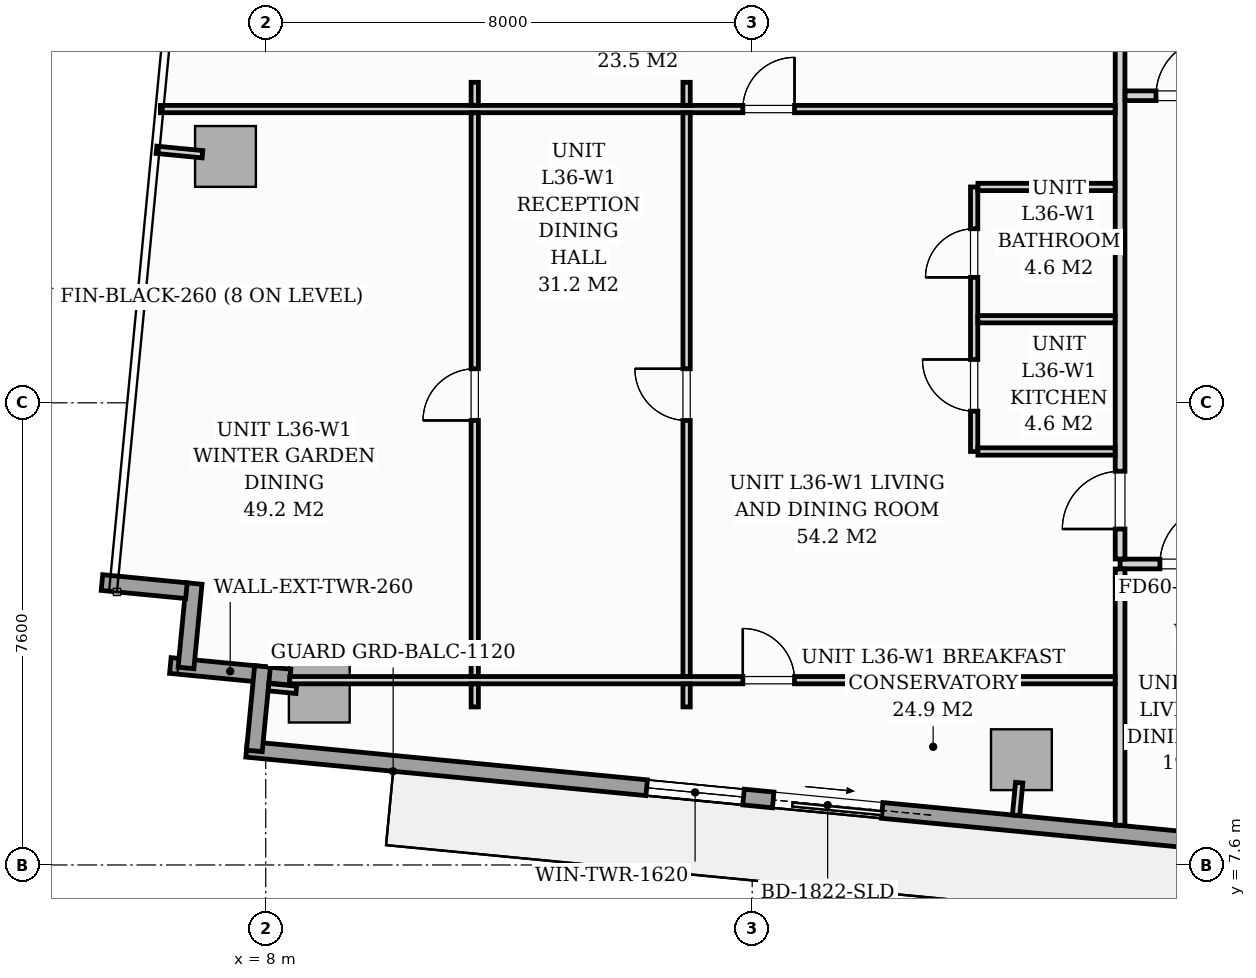
"""IFC4 building model, lengths in metres.
Left out: names, types, materials, properties, quantities, classifications, styles, units other than length and angle.
Written with IfcOpenShell. Run it as: python <this file> out.ifc"""

import sys

from ifc_helpers import new_model, si_unit, direction, frame, frame_2d, origin, origin_2d, place, context, subcontext, project, spatial, rectangle, extrude, source, transform, mapped, element, fill, save


model = new_model("IFC4")
c1 = context("Model", 3, precision=1e-05, world=origin(), true_north=direction((0.0, 1.0)))
c2 = subcontext(c1, "Body", "Model", "MODEL_VIEW")
j1 = project(units=[si_unit("LENGTHUNIT", "METRE"), si_unit("PLANEANGLEUNIT", "RADIAN")], contexts=[c1])
p1 = place(None, origin())
s1 = spatial("IfcSite", under=j1, at=p1, CompositionType="ELEMENT")
p2 = place(p1, origin())
s2 = spatial("IfcBuilding", under=s1, at=p2, CompositionType="ELEMENT")
p3 = place(p2, frame((0.0, 0.0, 127.8)))
s3 = spatial("IfcBuildingStorey", under=s2, at=p3, CompositionType="ELEMENT", Elevation=127.8)
m1 = source(origin(), c2, "Body", "SweptSolid", [
    extrude(rectangle(XDim=1.0, YDim=1.0, at=origin_2d()), origin(), (0.0, 0.0, 1.0), 3.196),
])
for number, where, z_axis, x_axis in (
    (1, (8.881, 10.443, 0.002), (0.0, 0.0, 1.0), (0.995, -0.096, 0.0)),
    (2, (20.427, 9.332, 0.002), (0.0, 0.0, 1.0), (0.995, -0.096, 0.0)),
    (3, (7.338, 19.252, 0.002), (0.0, 0.0, 1.0), (0.995, -0.096, 0.0)),
):
    element("IfcColumn", number, at=place(p3, frame(where, z_axis=z_axis, x_axis=x_axis)), inside=s3, PredefinedType="COLUMN", context=c2, shape_type="MappedRepresentation", body=[
        mapped(m1, transform((0.0, 0.0, 0.0), scale=1.0)),
    ])
p4 = place(p3, frame((8.4, 10.69, 0.0), z_axis=(0.0, 0.0, 1.0), x_axis=(-0.995391147587, 0.095898192396, 0.0)))
e4 = element("IfcWall", 4, at=p4, inside=s3, PredefinedType="STANDARD", context=c2, shape_type="SweptSolid", body=[
    extrude(rectangle(XDim=1.978, YDim=0.26, at=frame_2d((0.989, 0.0))), origin(), (0.0, 0.0, 1.0), 2.94),
])
p5 = place(p3, frame((6.688, 10.84, 0.0), z_axis=(0.0, 0.0, 1.0), x_axis=(0.09589913835, 0.995391056452, 0.0)))
e5 = element("IfcWall", 5, at=p5, inside=s3, PredefinedType="STANDARD", context=c2, shape_type="SweptSolid", body=[
    extrude(rectangle(XDim=1.395, YDim=0.26, at=frame_2d((0.698, 0.0))), origin(), (0.0, 0.0, 1.0), 2.94),
])
p6 = place(p3, frame((6.695, 12.111, 0.0), z_axis=(0.0, 0.0, 1.0), x_axis=(-0.99540614245, 0.095742423056, 0.0)))
e6 = element("IfcWall", 6, at=p6, inside=s3, PredefinedType="STANDARD", context=c2, shape_type="SweptSolid", body=[
    extrude(rectangle(XDim=1.395, YDim=0.26, at=frame_2d((0.697, 0.0))), origin(), (0.0, 0.0, 1.0), 2.94),
])
p7 = place(p3, frame((24.617, 7.873, 0.0), z_axis=(0.0, 0.0, 1.0), x_axis=(-0.995395976631, 0.095848055311, 0.0)))
e7 = element("IfcWall", 7, at=p7, inside=s3, PredefinedType="STANDARD", context=c2, shape_type="SweptSolid", body=[
    extrude(rectangle(XDim=17.01, YDim=0.26, at=frame_2d((8.505, 0.0))), origin(), (0.0, 0.0, 1.0), 2.94),
])
p8 = place(p7, frame((6.51, 0.0, 0.0)))
e8 = element("IfcOpeningElement", 8, at=p8, cuts=e7, PredefinedType="OPENING", context=c2, shape_type="SweptSolid", body=[
    extrude(rectangle(XDim=1.8, YDim=2.06, at=frame_2d((0.9, 1.03))), frame((0.0, 0.14, 0.0), z_axis=(0.0, -1.0, 0.0), x_axis=(1.0, 0.0, 0.0)), (0.0, 0.0, 1.0), 0.28),
])
p9 = place(p7, frame((8.8, 0.0, 0.65)))
e9 = element("IfcOpeningElement", 9, at=p9, cuts=e7, PredefinedType="OPENING", context=c2, shape_type="SweptSolid", body=[
    extrude(rectangle(XDim=1.6, YDim=1.5, at=frame_2d((0.8, 0.75))), frame((0.0, 0.14, 0.0), z_axis=(0.0, -1.0, 0.0), x_axis=(1.0, 0.0, 0.0)), (0.0, 0.0, 1.0), 0.28),
])
p10 = place(p3, frame((7.813, 9.476, 0.0), z_axis=(0.0, 0.0, 1.0), x_axis=(0.095915846097, 0.995389446633, 0.0)))
e10 = element("IfcWall", 10, at=p10, inside=s3, PredefinedType="STANDARD", context=c2, shape_type="SweptSolid", body=[
    extrude(rectangle(XDim=1.395, YDim=0.26, at=frame_2d((0.697, 0.0))), origin(), (0.0, 0.0, 1.0), 2.94),
])
p11 = place(p3, frame((22.05, 12.55, 0.0), z_axis=(0.0, 0.0, 1.0), x_axis=(1.0, 0.0, 0.0)))
e11 = element("IfcWall", 11, at=p11, inside=s3, PredefinedType="PARTITIONING", context=c2, shape_type="SweptSolid", body=[
    extrude(rectangle(XDim=23.83, YDim=0.16, at=frame_2d((11.915, 0.0))), origin(), (0.0, 0.0, 1.0), 2.94),
])
p12 = place(p11, frame((0.655, 0.0, 0.0)))
e12 = element("IfcOpeningElement", 12, at=p12, cuts=e11, PredefinedType="OPENING", context=c2, shape_type="SweptSolid", body=[
    extrude(rectangle(XDim=0.95, YDim=2.06, at=frame_2d((0.475, 1.03))), frame((0.0, 0.09, 0.0), z_axis=(0.0, -1.0, 0.0), x_axis=(1.0, 0.0, 0.0)), (0.0, 0.0, 1.0), 0.18),
])
p13 = place(p11, frame((12.04, 0.0, 0.0)))
e13 = element("IfcOpeningElement", 13, at=p13, cuts=e11, PredefinedType="OPENING", context=c2, shape_type="SweptSolid", body=[
    extrude(rectangle(XDim=0.95, YDim=2.06, at=frame_2d((0.475, 1.03))), frame((0.0, 0.09, 0.0), z_axis=(0.0, -1.0, 0.0), x_axis=(1.0, 0.0, 0.0)), (0.0, 0.0, 1.0), 0.18),
])
p14 = place(p3, frame((22.05, 8.253, 0.0), z_axis=(0.0, 0.0, 1.0), x_axis=(0.0, 1.0, 0.0)))
e14 = element("IfcWall", 14, at=p14, inside=s3, PredefinedType="PARTITIONING", context=c2, shape_type="SweptSolid", body=[
    extrude(rectangle(XDim=4.215, YDim=0.16, at=frame_2d((2.107, 0.0))), origin(), (0.0, 0.0, 1.0), 2.94),
])
p15 = place(p3, frame((22.05, 12.632, 0.0), z_axis=(0.0, 0.0, 1.0), x_axis=(0.0, 1.0, 0.0)))
e15 = element("IfcWall", 15, at=p15, inside=s3, PredefinedType="PARTITIONING", context=c2, shape_type="SweptSolid", body=[
    extrude(rectangle(XDim=14.785, YDim=0.16, at=frame_2d((7.393, 0.0))), origin(), (0.0, 0.0, 1.0), 2.94),
])
p16 = place(p15, frame((0.493, 0.0, 0.0)))
e16 = element("IfcOpeningElement", 16, at=p16, cuts=e15, PredefinedType="OPENING", context=c2, shape_type="SweptSolid", body=[
    extrude(rectangle(XDim=0.95, YDim=2.06, at=frame_2d((0.475, 1.03))), frame((0.0, 0.09, 0.0), z_axis=(0.0, -1.0, 0.0), x_axis=(1.0, 0.0, 0.0)), (0.0, 0.0, 1.0), 0.18),
])
p17 = place(p3, frame((19.65, 14.4, 0.0), z_axis=(0.0, 0.0, 1.0), x_axis=(0.0, 1.0, 0.0)))
e17 = element("IfcWall", 17, at=p17, inside=s3, PredefinedType="PARTITIONING", context=c2, shape_type="SweptSolid", body=[
    extrude(rectangle(XDim=4.35, YDim=0.12, at=frame_2d((2.175, 0.0))), origin(), (0.0, 0.0, 1.0), 2.94),
])
p18 = place(p17, frame((0.663, 0.0, 0.0)))
e18 = element("IfcOpeningElement", 18, at=p18, cuts=e17, PredefinedType="OPENING", context=c2, shape_type="SweptSolid", body=[
    extrude(rectangle(XDim=0.85, YDim=2.05, at=frame_2d((0.425, 1.025))), frame((0.0, 0.07, 0.0), z_axis=(0.0, -1.0, 0.0), x_axis=(1.0, 0.0, 0.0)), (0.0, 0.0, 1.0), 0.14),
])
p19 = place(p17, frame((2.863, 0.0, 0.0)))
e19 = element("IfcOpeningElement", 19, at=p19, cuts=e17, PredefinedType="OPENING", context=c2, shape_type="SweptSolid", body=[
    extrude(rectangle(XDim=0.8, YDim=2.02, at=frame_2d((0.4, 1.01))), frame((0.0, 0.07, 0.0), z_axis=(0.0, -1.0, 0.0), x_axis=(1.0, 0.0, 0.0)), (0.0, 0.0, 1.0), 0.14),
])
for number, where, z_axis, x_axis in (
    (20, (19.712, 16.575, 0.0), (0.0, 0.0, 1.0), (1.0, 0.0, 0.0)),
    (21, (19.712, 14.4, 0.0), (0.0, 0.0, 1.0), (1.0, 0.0, 0.0)),
    (22, (19.712, 18.75, 0.0), (0.0, 0.0, 1.0), (1.0, 0.0, 0.0)),
):
    element("IfcWall", number, at=place(p3, frame(where, z_axis=z_axis, x_axis=x_axis)), inside=s3, PredefinedType="PARTITIONING", context=c2, shape_type="SweptSolid", body=[
        extrude(rectangle(XDim=2.256, YDim=0.12, at=frame_2d((1.128, 0.0))), origin(), (0.0, 0.0, 1.0), 2.94),
    ])
p20 = place(p3, frame((8.395, 10.639, 0.0), z_axis=(0.0, 0.0, 1.0), x_axis=(1.0, 0.0, 0.0)))
e23 = element("IfcWall", 23, at=p20, inside=s3, PredefinedType="PARTITIONING", context=c2, shape_type="SweptSolid", body=[
    extrude(rectangle(XDim=13.573, YDim=0.12, at=frame_2d((6.787, 0.0))), origin(), (0.0, 0.0, 1.0), 2.94),
])
p21 = place(p20, frame((7.451, 0.0, 0.0)))
e24 = element("IfcOpeningElement", 24, at=p21, cuts=e23, PredefinedType="OPENING", context=c2, shape_type="SweptSolid", body=[
    extrude(rectangle(XDim=0.85, YDim=2.05, at=frame_2d((0.425, 1.025))), frame((0.0, 0.07, 0.0), z_axis=(0.0, -1.0, 0.0), x_axis=(1.0, 0.0, 0.0)), (0.0, 0.0, 1.0), 0.14),
])
p22 = place(p3, frame((6.268, 20.031, 0.0), z_axis=(0.0, 0.0, 1.0), x_axis=(1.0, 0.0, 0.0)))
e25 = element("IfcWall", 25, at=p22, inside=s3, PredefinedType="PARTITIONING", context=c2, shape_type="SweptSolid", body=[
    extrude(rectangle(XDim=15.7, YDim=0.12, at=frame_2d((7.85, 0.0))), origin(), (0.0, 0.0, 1.0), 2.94),
])
p23 = place(p22, frame((9.579, 0.0, 0.0)))
e26 = element("IfcOpeningElement", 26, at=p23, cuts=e25, PredefinedType="OPENING", context=c2, shape_type="SweptSolid", body=[
    extrude(rectangle(XDim=0.85, YDim=2.05, at=frame_2d((0.425, 1.025))), frame((0.0, 0.07, 0.0), z_axis=(0.0, -1.0, 0.0), x_axis=(1.0, 0.0, 0.0)), (0.0, 0.0, 1.0), 0.14),
])
p24 = place(p3, frame((11.437, 10.199, 0.0), z_axis=(0.0, 0.0, 1.0), x_axis=(0.0, 1.0, 0.0)))
e27 = element("IfcWall", 27, at=p24, inside=s3, PredefinedType="PARTITIONING", context=c2, shape_type="SweptSolid", body=[
    extrude(rectangle(XDim=0.378, YDim=0.12, at=frame_2d((0.189, 0.0))), origin(), (0.0, 0.0, 1.0), 2.94),
])
p25 = place(p3, frame((11.437, 10.701, 0.0), z_axis=(0.0, 0.0, 1.0), x_axis=(0.0, 1.0, 0.0)))
e28 = element("IfcWall", 28, at=p25, inside=s3, PredefinedType="PARTITIONING", context=c2, shape_type="SweptSolid", body=[
    extrude(rectangle(XDim=9.268, YDim=0.12, at=frame_2d((4.634, 0.0))), origin(), (0.0, 0.0, 1.0), 2.94),
])
p26 = place(p25, frame((4.209, 0.0, 0.0)))
e29 = element("IfcOpeningElement", 29, at=p26, cuts=e28, PredefinedType="OPENING", context=c2, shape_type="SweptSolid", body=[
    extrude(rectangle(XDim=0.85, YDim=2.05, at=frame_2d((0.425, 1.025))), frame((0.0, 0.07, 0.0), z_axis=(0.0, -1.0, 0.0), x_axis=(1.0, 0.0, 0.0)), (0.0, 0.0, 1.0), 0.14),
])
for number, where, z_axis, x_axis in (
    (30, (11.437, 20.093, 0.0), (0.0, 0.0, 1.0), (0.0, 1.0, 0.0)),
    (31, (14.921, 10.199, 0.0), (0.0, 0.0, 1.0), (0.0, 1.0, 0.0)),
):
    element("IfcWall", number, at=place(p3, frame(where, z_axis=z_axis, x_axis=x_axis)), inside=s3, PredefinedType="PARTITIONING", context=c2, shape_type="SweptSolid", body=[
        extrude(rectangle(XDim=0.378, YDim=0.12, at=frame_2d((0.189, 0.0))), origin(), (0.0, 0.0, 1.0), 2.94),
    ])
p27 = place(p3, frame((14.921, 10.701, 0.0), z_axis=(0.0, 0.0, 1.0), x_axis=(0.0, 1.0, 0.0)))
e32 = element("IfcWall", 32, at=p27, inside=s3, PredefinedType="PARTITIONING", context=c2, shape_type="SweptSolid", body=[
    extrude(rectangle(XDim=9.268, YDim=0.12, at=frame_2d((4.634, 0.0))), origin(), (0.0, 0.0, 1.0), 2.94),
])
p28 = place(p27, frame((4.209, 0.0, 0.0)))
e33 = element("IfcOpeningElement", 33, at=p28, cuts=e32, PredefinedType="OPENING", context=c2, shape_type="SweptSolid", body=[
    extrude(rectangle(XDim=0.85, YDim=2.05, at=frame_2d((0.425, 1.025))), frame((0.0, 0.07, 0.0), z_axis=(0.0, -1.0, 0.0), x_axis=(1.0, 0.0, 0.0)), (0.0, 0.0, 1.0), 0.14),
])
p29 = place(p3, frame((14.921, 20.093, 0.0), z_axis=(0.0, 0.0, 1.0), x_axis=(0.0, 1.0, 0.0)))
e34 = element("IfcWall", 34, at=p29, inside=s3, PredefinedType="PARTITIONING", context=c2, shape_type="SweptSolid", body=[
    extrude(rectangle(XDim=0.378, YDim=0.12, at=frame_2d((0.189, 0.0))), origin(), (0.0, 0.0, 1.0), 2.94),
])
p30 = place(p3, frame((22.132, 20.25, 0.0), z_axis=(0.0, 0.0, 1.0), x_axis=(1.0, 0.0, 0.0)))
e35 = element("IfcWall", 35, at=p30, inside=s3, PredefinedType="PARTITIONING", context=c2, shape_type="SweptSolid", body=[
    extrude(rectangle(XDim=1.886, YDim=0.16, at=frame_2d((0.943, 0.0))), origin(), (0.0, 0.0, 1.0), 2.94),
])
p31 = place(p30, frame((0.508, 0.0, 0.0)))
e36 = element("IfcOpeningElement", 36, at=p31, cuts=e35, PredefinedType="OPENING", context=c2, shape_type="SweptSolid", body=[
    extrude(rectangle(XDim=0.95, YDim=2.06, at=frame_2d((0.475, 1.03))), frame((0.0, 0.09, 0.0), z_axis=(0.0, -1.0, 0.0), x_axis=(1.0, 0.0, 0.0)), (0.0, 0.0, 1.0), 0.18),
])
p32 = place(p3, frame((8.502, 10.48, 0.0), z_axis=(0.0, 0.0, 1.0), x_axis=(-0.995384576284, 0.09596637586, 0.0)))
e37 = element("IfcWall", 37, at=p32, inside=s3, PredefinedType="PARTITIONING", context=c2, shape_type="SweptSolid", body=[
    extrude(rectangle(XDim=0.458, YDim=0.12, at=frame_2d((0.229, 0.0))), origin(), (0.0, 0.0, 1.0), 2.94),
])
p33 = place(p3, frame((20.391, 8.953, 0.0), z_axis=(0.0, 0.0, 1.0), x_axis=(-0.096222656154, -0.995359834654, 0.0)))
e38 = element("IfcWall", 38, at=p33, inside=s3, PredefinedType="PARTITIONING", context=c2, shape_type="SweptSolid", body=[
    extrude(rectangle(XDim=0.538, YDim=0.12, at=frame_2d((0.269, 0.0))), origin(), (0.0, 0.0, 1.0), 2.94),
])
p34 = place(p3, frame((6.959, 19.288, 0.0), z_axis=(0.0, 0.0, 1.0), x_axis=(-0.995377786728, 0.096036772582, 0.0)))
e39 = element("IfcWall", 39, at=p34, inside=s3, PredefinedType="PARTITIONING", context=c2, shape_type="SweptSolid", body=[
    extrude(rectangle(XDim=0.76, YDim=0.12, at=frame_2d((0.38, 0.0))), origin(), (0.0, 0.0, 1.0), 2.94),
])
m2 = source(origin(), c2, "Body", "SweptSolid", [
    extrude(rectangle(XDim=1.8, YDim=2.06, at=frame_2d((0.9, 1.03))), frame((0.0, 0.025, 0.0), z_axis=(0.0, -1.0, 0.0), x_axis=(1.0, 0.0, 0.0)), (0.0, 0.0, 1.0), 0.05),
])
p35 = place(p8, origin())
e40 = element("IfcDoor", 40, at=p35, inside=s3, OperationType="SLIDING_TO_LEFT", PredefinedType="DOOR", context=c2, shape_type="MappedRepresentation", body=[
    mapped(m2, transform((0.0, 0.0, 0.0), scale=1.0)),
])
fill(e8, e40)
m3 = source(origin(), c2, "Body", "SweptSolid", [
    extrude(rectangle(XDim=1.6, YDim=1.5, at=frame_2d((0.8, 0.75))), frame((0.0, 0.03, 0.0), z_axis=(0.0, -1.0, 0.0), x_axis=(1.0, 0.0, 0.0)), (0.0, 0.0, 1.0), 0.06),
])
p36 = place(p9, origin())
e41 = element("IfcWindow", 41, at=p36, inside=s3, PartitioningType="SINGLE_PANEL", PredefinedType="WINDOW", context=c2, shape_type="MappedRepresentation", body=[
    mapped(m3, transform((0.0, 0.0, 0.0), scale=1.0)),
])
fill(e9, e41)
m4 = source(origin(), c2, "Body", "SweptSolid", [
    extrude(rectangle(XDim=0.95, YDim=2.06, at=frame_2d((0.475, 1.03))), frame((0.0, 0.025, 0.0), z_axis=(0.0, -1.0, 0.0), x_axis=(1.0, 0.0, 0.0)), (0.0, 0.0, 1.0), 0.05),
])
p37 = place(p12, origin())
e42 = element("IfcDoor", 42, at=p37, inside=s3, OperationType="SINGLE_SWING_RIGHT", PredefinedType="DOOR", context=c2, shape_type="MappedRepresentation", body=[
    mapped(m4, transform((0.0, 0.0, 0.0), scale=1.0)),
])
fill(e12, e42)
p38 = place(p16, origin())
e43 = element("IfcDoor", 43, at=p38, inside=s3, OperationType="SINGLE_SWING_LEFT", PredefinedType="DOOR", context=c2, shape_type="MappedRepresentation", body=[
    mapped(m4, transform((0.0, 0.0, 0.0), scale=1.0)),
])
fill(e16, e43)
m5 = source(origin(), c2, "Body", "SweptSolid", [
    extrude(rectangle(XDim=0.85, YDim=2.05, at=frame_2d((0.425, 1.025))), frame((0.0, 0.025, 0.0), z_axis=(0.0, -1.0, 0.0), x_axis=(1.0, 0.0, 0.0)), (0.0, 0.0, 1.0), 0.05),
])
p39 = place(p18, origin())
e44 = element("IfcDoor", 44, at=p39, inside=s3, OperationType="SINGLE_SWING_RIGHT", PredefinedType="DOOR", context=c2, shape_type="MappedRepresentation", body=[
    mapped(m5, transform((0.0, 0.0, 0.0), scale=1.0)),
])
fill(e18, e44)
m6 = source(origin(), c2, "Body", "SweptSolid", [
    extrude(rectangle(XDim=0.8, YDim=2.02, at=frame_2d((0.4, 1.01))), frame((0.0, 0.025, 0.0), z_axis=(0.0, -1.0, 0.0), x_axis=(1.0, 0.0, 0.0)), (0.0, 0.0, 1.0), 0.05),
])
p40 = place(p19, origin())
e45 = element("IfcDoor", 45, at=p40, inside=s3, OperationType="SINGLE_SWING_LEFT", PredefinedType="DOOR", context=c2, shape_type="MappedRepresentation", body=[
    mapped(m6, transform((0.0, 0.0, 0.0), scale=1.0)),
])
fill(e19, e45)
p41 = place(p21, origin())
e46 = element("IfcDoor", 46, at=p41, inside=s3, OperationType="SINGLE_SWING_LEFT", PredefinedType="DOOR", context=c2, shape_type="MappedRepresentation", body=[
    mapped(m5, transform((0.0, 0.0, 0.0), scale=1.0)),
])
fill(e24, e46)
p42 = place(p23, origin())
e47 = element("IfcDoor", 47, at=p42, inside=s3, OperationType="SINGLE_SWING_RIGHT", PredefinedType="DOOR", context=c2, shape_type="MappedRepresentation", body=[
    mapped(m5, transform((0.0, 0.0, 0.0), scale=1.0)),
])
fill(e26, e47)
p43 = place(p26, origin())
e48 = element("IfcDoor", 48, at=p43, inside=s3, OperationType="SINGLE_SWING_LEFT", PredefinedType="DOOR", context=c2, shape_type="MappedRepresentation", body=[
    mapped(m5, transform((0.0, 0.0, 0.0), scale=1.0)),
])
fill(e29, e48)
p44 = place(p28, origin())
e49 = element("IfcDoor", 49, at=p44, inside=s3, OperationType="SINGLE_SWING_RIGHT", PredefinedType="DOOR", context=c2, shape_type="MappedRepresentation", body=[
    mapped(m5, transform((0.0, 0.0, 0.0), scale=1.0)),
])
fill(e33, e49)
p45 = place(p31, origin())
e50 = element("IfcDoor", 50, at=p45, inside=s3, OperationType="SINGLE_SWING_RIGHT", PredefinedType="DOOR", context=c2, shape_type="MappedRepresentation", body=[
    mapped(m4, transform((0.0, 0.0, 0.0), scale=1.0)),
])
fill(e36, e50)
save(model, sys.argv[1])
